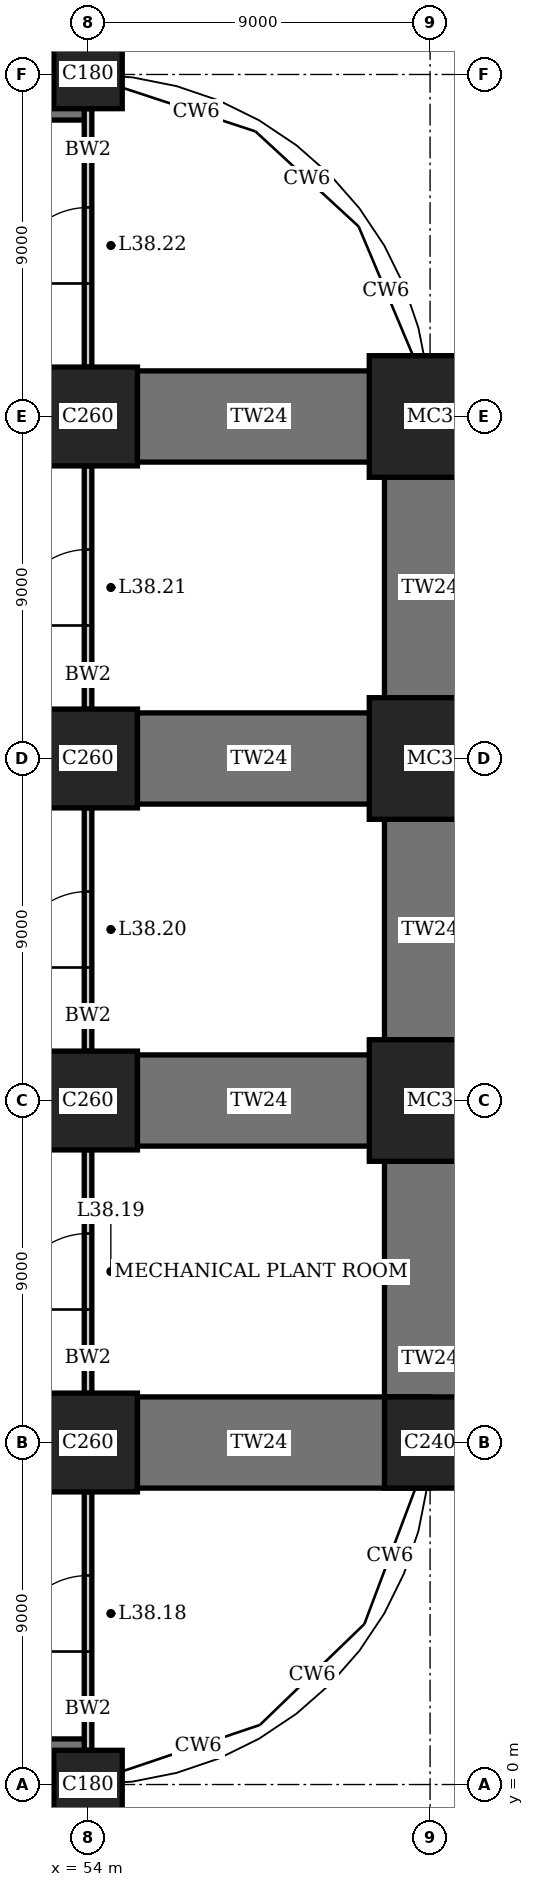
"""IFC4 building model, lengths in metres.
Left out: names, types, materials, properties, quantities, classifications, styles, units other than length and angle.
Written with IfcOpenShell. Run it as: python <this file> out.ifc"""

import sys

from ifc_helpers import new_model, si_unit, direction, frame, frame_2d, origin, origin_2d, place, context, subcontext, project, spatial, rectangle, extrude, element, fill, save


model = new_model("IFC4")
c1 = context("Model", 3, precision=1e-05, world=origin(), true_north=direction((0.0, 1.0)))
c2 = subcontext(c1, "Body", "Model", "MODEL_VIEW")
j1 = project(units=[si_unit("LENGTHUNIT", "METRE"), si_unit("PLANEANGLEUNIT", "RADIAN")], contexts=[c1])
p1 = place(None, origin())
s1 = spatial("IfcSite", under=j1, at=p1, CompositionType="ELEMENT")
p2 = place(p1, origin())
s2 = spatial("IfcBuilding", under=s1, at=p2, CompositionType="ELEMENT")
p3 = place(p2, frame((0.0, 0.0, 157.2)))
s3 = spatial("IfcBuildingStorey", under=s2, at=p3, CompositionType="ELEMENT", Elevation=157.2)
p4 = place(p3, frame((54.0, 0.0, 0.0), z_axis=(0.0, 0.0, 1.0), x_axis=(1.0, 0.0, 0.0)))
e1 = element("IfcColumn", 1, at=p4, inside=s3, PredefinedType="COLUMN", context=c2, shape_type="SweptSolid", body=[
    extrude(rectangle(XDim=1.8, YDim=1.8, at=origin_2d()), origin(), (0.0, 0.0, 1.0), 5.0),
])
for number, where, z_axis, x_axis in (
    (2, (54.0, 9.0, 0.0), (0.0, 0.0, 1.0), (1.0, 0.0, 0.0)),
    (3, (54.0, 18.0, 0.0), (0.0, 0.0, 1.0), (1.0, 0.0, 0.0)),
    (4, (54.0, 27.0, 0.0), (0.0, 0.0, 1.0), (1.0, 0.0, 0.0)),
    (5, (54.0, 36.0, 0.0), (0.0, 0.0, 1.0), (1.0, 0.0, 0.0)),
):
    element("IfcColumn", number, at=place(p3, frame(where, z_axis=z_axis, x_axis=x_axis)), inside=s3, PredefinedType="COLUMN", context=c2, shape_type="SweptSolid", body=[
        extrude(rectangle(XDim=2.6, YDim=2.6, at=origin_2d()), origin(), (0.0, 0.0, 1.0), 5.0),
    ])
p5 = place(p3, frame((54.0, 45.0, 0.0), z_axis=(0.0, 0.0, 1.0), x_axis=(1.0, 0.0, 0.0)))
e6 = element("IfcColumn", 6, at=p5, inside=s3, PredefinedType="COLUMN", context=c2, shape_type="SweptSolid", body=[
    extrude(rectangle(XDim=1.8, YDim=1.8, at=origin_2d()), origin(), (0.0, 0.0, 1.0), 5.0),
])
p6 = place(p3, frame((63.0, 9.0, 0.0), z_axis=(0.0, 0.0, 1.0), x_axis=(1.0, 0.0, 0.0)))
e7 = element("IfcColumn", 7, at=p6, inside=s3, PredefinedType="COLUMN", context=c2, shape_type="SweptSolid", body=[
    extrude(rectangle(XDim=2.4, YDim=2.4, at=origin_2d()), origin(), (0.0, 0.0, 1.0), 5.0),
])
for number, where, z_axis, x_axis in (
    (8, (63.0, 18.0, 0.0), (0.0, 0.0, 1.0), (1.0, 0.0, 0.0)),
    (9, (63.0, 27.0, 0.0), (0.0, 0.0, 1.0), (1.0, 0.0, 0.0)),
    (10, (63.0, 36.0, 0.0), (0.0, 0.0, 1.0), (1.0, 0.0, 0.0)),
):
    element("IfcColumn", number, at=place(p3, frame(where, z_axis=z_axis, x_axis=x_axis)), inside=s3, PredefinedType="COLUMN", context=c2, shape_type="SweptSolid", body=[
        extrude(rectangle(XDim=3.2, YDim=3.2, at=origin_2d()), origin(), (0.0, 0.0, 1.0), 5.0),
    ])
for number, where, z_axis, x_axis in (
    (11, (45.0, 0.0, 0.0), (0.0, 0.0, 1.0), (1.0, 0.0, 0.0)),
    (12, (45.0, 45.0, 0.0), (0.0, 0.0, 1.0), (1.0, 0.0, 0.0)),
    (13, (63.0, 9.0, 0.0), (0.0, 0.0, 1.0), (0.0, 1.0, 0.0)),
    (14, (63.0, 18.0, 0.0), (0.0, 0.0, 1.0), (0.0, 1.0, 0.0)),
    (15, (63.0, 27.0, 0.0), (0.0, 0.0, 1.0), (0.0, 1.0, 0.0)),
    (16, (54.0, 9.0, 0.0), (0.0, 0.0, 1.0), (1.0, 0.0, 0.0)),
    (17, (54.0, 18.0, 0.0), (0.0, 0.0, 1.0), (1.0, 0.0, 0.0)),
    (18, (54.0, 27.0, 0.0), (0.0, 0.0, 1.0), (1.0, 0.0, 0.0)),
    (19, (54.0, 36.0, 0.0), (0.0, 0.0, 1.0), (1.0, 0.0, 0.0)),
):
    element("IfcWall", number, at=place(p3, frame(where, z_axis=z_axis, x_axis=x_axis)), inside=s3, PredefinedType="SHEAR", context=c2, shape_type="SweptSolid", body=[
        extrude(rectangle(XDim=9.0, YDim=2.4, at=frame_2d((4.5, 0.0))), origin(), (0.0, 0.0, 1.0), 5.0),
    ])
p7 = place(p3, frame((54.0, 0.9, 0.0), z_axis=(0.0, 0.0, 1.0), x_axis=(0.0, 1.0, 0.0)))
e20 = element("IfcWall", 20, at=p7, inside=s3, PredefinedType="SOLIDWALL", context=c2, shape_type="SweptSolid", body=[
    extrude(rectangle(XDim=6.8, YDim=0.2, at=frame_2d((3.4, 0.0))), origin(), (0.0, 0.0, 1.0), 3.8),
])
p8 = place(p7, frame((2.6, 0.0, 0.0)))
e21 = element("IfcOpeningElement", 21, at=p8, cuts=e20, PredefinedType="OPENING", context=c2, shape_type="SweptSolid", body=[
    extrude(rectangle(XDim=2.0, YDim=2.7, at=frame_2d((1.0, 1.35))), frame((0.0, 0.11, 0.0), z_axis=(0.0, -1.0, 0.0), x_axis=(1.0, 0.0, 0.0)), (0.0, 0.0, 1.0), 0.22),
])
p9 = place(p3, frame((54.0, 10.3, 0.0), z_axis=(0.0, 0.0, 1.0), x_axis=(0.0, 1.0, 0.0)))
e22 = element("IfcWall", 22, at=p9, inside=s3, PredefinedType="SOLIDWALL", context=c2, shape_type="SweptSolid", body=[
    extrude(rectangle(XDim=6.4, YDim=0.2, at=frame_2d((3.2, 0.0))), origin(), (0.0, 0.0, 1.0), 3.8),
])
p10 = place(p9, frame((2.2, 0.0, 0.0)))
e23 = element("IfcOpeningElement", 23, at=p10, cuts=e22, PredefinedType="OPENING", context=c2, shape_type="SweptSolid", body=[
    extrude(rectangle(XDim=2.0, YDim=2.7, at=frame_2d((1.0, 1.35))), frame((0.0, 0.11, 0.0), z_axis=(0.0, -1.0, 0.0), x_axis=(1.0, 0.0, 0.0)), (0.0, 0.0, 1.0), 0.22),
])
p11 = place(p3, frame((54.0, 19.3, 0.0), z_axis=(0.0, 0.0, 1.0), x_axis=(0.0, 1.0, 0.0)))
e24 = element("IfcWall", 24, at=p11, inside=s3, PredefinedType="SOLIDWALL", context=c2, shape_type="SweptSolid", body=[
    extrude(rectangle(XDim=6.4, YDim=0.2, at=frame_2d((3.2, 0.0))), origin(), (0.0, 0.0, 1.0), 3.8),
])
p12 = place(p11, frame((2.2, 0.0, 0.0)))
e25 = element("IfcOpeningElement", 25, at=p12, cuts=e24, PredefinedType="OPENING", context=c2, shape_type="SweptSolid", body=[
    extrude(rectangle(XDim=2.0, YDim=2.7, at=frame_2d((1.0, 1.35))), frame((0.0, 0.11, 0.0), z_axis=(0.0, -1.0, 0.0), x_axis=(1.0, 0.0, 0.0)), (0.0, 0.0, 1.0), 0.22),
])
p13 = place(p3, frame((54.0, 28.3, 0.0), z_axis=(0.0, 0.0, 1.0), x_axis=(0.0, 1.0, 0.0)))
e26 = element("IfcWall", 26, at=p13, inside=s3, PredefinedType="SOLIDWALL", context=c2, shape_type="SweptSolid", body=[
    extrude(rectangle(XDim=6.4, YDim=0.2, at=frame_2d((3.2, 0.0))), origin(), (0.0, 0.0, 1.0), 3.8),
])
p14 = place(p13, frame((2.2, 0.0, 0.0)))
e27 = element("IfcOpeningElement", 27, at=p14, cuts=e26, PredefinedType="OPENING", context=c2, shape_type="SweptSolid", body=[
    extrude(rectangle(XDim=2.0, YDim=2.7, at=frame_2d((1.0, 1.35))), frame((0.0, 0.11, 0.0), z_axis=(0.0, -1.0, 0.0), x_axis=(1.0, 0.0, 0.0)), (0.0, 0.0, 1.0), 0.22),
])
p15 = place(p3, frame((54.0, 37.3, 0.0), z_axis=(0.0, 0.0, 1.0), x_axis=(0.0, 1.0, 0.0)))
e28 = element("IfcWall", 28, at=p15, inside=s3, PredefinedType="SOLIDWALL", context=c2, shape_type="SweptSolid", body=[
    extrude(rectangle(XDim=6.8, YDim=0.2, at=frame_2d((3.4, 0.0))), origin(), (0.0, 0.0, 1.0), 3.8),
])
p16 = place(p15, frame((2.2, 0.0, 0.0)))
e29 = element("IfcOpeningElement", 29, at=p16, cuts=e28, PredefinedType="OPENING", context=c2, shape_type="SweptSolid", body=[
    extrude(rectangle(XDim=2.0, YDim=2.7, at=frame_2d((1.0, 1.35))), frame((0.0, 0.11, 0.0), z_axis=(0.0, -1.0, 0.0), x_axis=(1.0, 0.0, 0.0)), (0.0, 0.0, 1.0), 0.22),
])
p17 = place(p8, origin())
e30 = element("IfcDoor", 30, at=p17, inside=s3, OperationType="DOUBLE_DOOR_SINGLE_SWING", PredefinedType="DOOR", context=c2, shape_type="SweptSolid", body=[
    extrude(rectangle(XDim=2.0, YDim=2.7, at=frame_2d((1.0, 1.35))), frame((0.0, 0.03, 0.0), z_axis=(0.0, -1.0, 0.0), x_axis=(1.0, 0.0, 0.0)), (0.0, 0.0, 1.0), 0.06),
])
fill(e21, e30)
p18 = place(p10, origin())
e31 = element("IfcDoor", 31, at=p18, inside=s3, OperationType="DOUBLE_DOOR_SINGLE_SWING", PredefinedType="DOOR", context=c2, shape_type="SweptSolid", body=[
    extrude(rectangle(XDim=2.0, YDim=2.7, at=frame_2d((1.0, 1.35))), frame((0.0, 0.03, 0.0), z_axis=(0.0, -1.0, 0.0), x_axis=(1.0, 0.0, 0.0)), (0.0, 0.0, 1.0), 0.06),
])
fill(e23, e31)
p19 = place(p12, origin())
e32 = element("IfcDoor", 32, at=p19, inside=s3, OperationType="DOUBLE_DOOR_SINGLE_SWING", PredefinedType="DOOR", context=c2, shape_type="SweptSolid", body=[
    extrude(rectangle(XDim=2.0, YDim=2.7, at=frame_2d((1.0, 1.35))), frame((0.0, 0.03, 0.0), z_axis=(0.0, -1.0, 0.0), x_axis=(1.0, 0.0, 0.0)), (0.0, 0.0, 1.0), 0.06),
])
fill(e25, e32)
p20 = place(p14, origin())
e33 = element("IfcDoor", 33, at=p20, inside=s3, OperationType="DOUBLE_DOOR_SINGLE_SWING", PredefinedType="DOOR", context=c2, shape_type="SweptSolid", body=[
    extrude(rectangle(XDim=2.0, YDim=2.7, at=frame_2d((1.0, 1.35))), frame((0.0, 0.03, 0.0), z_axis=(0.0, -1.0, 0.0), x_axis=(1.0, 0.0, 0.0)), (0.0, 0.0, 1.0), 0.06),
])
fill(e27, e33)
p21 = place(p16, origin())
e34 = element("IfcDoor", 34, at=p21, inside=s3, OperationType="DOUBLE_DOOR_SINGLE_SWING", PredefinedType="DOOR", context=c2, shape_type="SweptSolid", body=[
    extrude(rectangle(XDim=2.0, YDim=2.7, at=frame_2d((1.0, 1.35))), frame((0.0, 0.03, 0.0), z_axis=(0.0, -1.0, 0.0), x_axis=(1.0, 0.0, 0.0)), (0.0, 0.0, 1.0), 0.06),
])
fill(e29, e34)
save(model, sys.argv[1])
